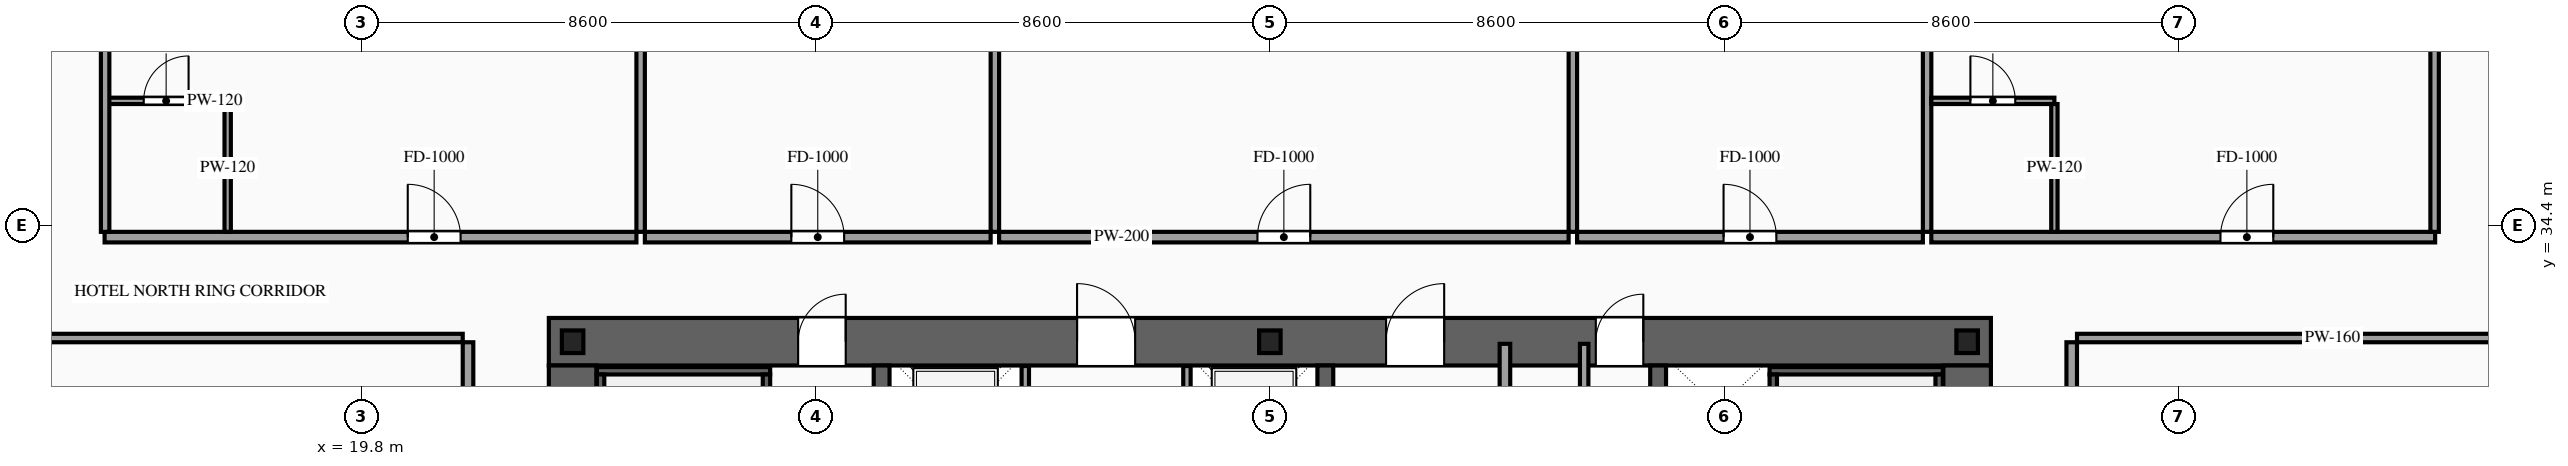
"""IFC4 building model, lengths in metres.
Left out: names, types, materials, properties, quantities, classifications, styles, units other than length and angle.
Written with IfcOpenShell. Run it as: python <this file> out.ifc"""

import sys

from ifc_helpers import new_model, si_unit, direction, frame, frame_2d, origin, origin_2d, place, context, subcontext, project, spatial, rectangle, i_section, extrude, source, transform, mapped, element, fill, save


model = new_model("IFC4")
c1 = context("Model", 3, precision=1e-05, world=origin(), true_north=direction((0.0, 1.0)))
c2 = subcontext(c1, "Body", "Model", "MODEL_VIEW")
j1 = project(units=[si_unit("LENGTHUNIT", "METRE"), si_unit("PLANEANGLEUNIT", "RADIAN")], contexts=[c1])
p1 = place(None, origin())
s1 = spatial("IfcSite", under=j1, at=p1, CompositionType="ELEMENT")
p2 = place(p1, origin())
s2 = spatial("IfcBuilding", under=s1, at=p2, CompositionType="ELEMENT")
p3 = place(p2, frame((0.0, 0.0, 56.8)))
s3 = spatial("IfcBuildingStorey", under=s2, at=p3, CompositionType="ELEMENT", Elevation=56.8)
p4 = place(p3, frame((23.35, 32.2, 0.0), z_axis=(0.0, 0.0, 1.0), x_axis=(1.0, 0.0, 0.0)))
e1 = element("IfcWall", 1, at=p4, inside=s3, PredefinedType="SHEAR", context=c2, shape_type="SweptSolid", body=[
    extrude(rectangle(XDim=27.3, YDim=0.9, at=frame_2d((13.65, 0.0))), origin(), (0.0, 0.0, 1.0), 3.6),
])
p5 = place(p4, frame((4.72, 0.0, 0.0)))
e2 = element("IfcOpeningElement", 2, at=p5, cuts=e1, PredefinedType="OPENING", context=c2, shape_type="SweptSolid", body=[
    extrude(rectangle(XDim=0.9, YDim=2.15, at=frame_2d((0.45, 1.075))), frame((0.0, 0.465, 0.0), z_axis=(0.0, -1.0, 0.0), x_axis=(1.0, 0.0, 0.0)), (0.0, 0.0, 1.0), 0.93),
])
p6 = place(p4, frame((10.0, 0.0, 0.0)))
e3 = element("IfcOpeningElement", 3, at=p6, cuts=e1, PredefinedType="OPENING", context=c2, shape_type="SweptSolid", body=[
    extrude(rectangle(XDim=1.1, YDim=2.2, at=frame_2d((0.55, 1.1))), frame((0.0, 0.465, 0.0), z_axis=(0.0, -1.0, 0.0), x_axis=(1.0, 0.0, 0.0)), (0.0, 0.0, 1.0), 0.93),
])
p7 = place(p4, frame((15.85, 0.0, 0.0)))
e4 = element("IfcOpeningElement", 4, at=p7, cuts=e1, PredefinedType="OPENING", context=c2, shape_type="SweptSolid", body=[
    extrude(rectangle(XDim=1.1, YDim=2.2, at=frame_2d((0.55, 1.1))), frame((0.0, 0.465, 0.0), z_axis=(0.0, -1.0, 0.0), x_axis=(1.0, 0.0, 0.0)), (0.0, 0.0, 1.0), 0.93),
])
p8 = place(p4, frame((19.82, 0.0, 0.0)))
e5 = element("IfcOpeningElement", 5, at=p8, cuts=e1, PredefinedType="OPENING", context=c2, shape_type="SweptSolid", body=[
    extrude(rectangle(XDim=0.9, YDim=2.15, at=frame_2d((0.45, 1.075))), frame((0.0, 0.465, 0.0), z_axis=(0.0, -1.0, 0.0), x_axis=(1.0, 0.0, 0.0)), (0.0, 0.0, 1.0), 0.93),
])
m1 = source(origin(), c2, "Body", "SweptSolid", [
    extrude(rectangle(XDim=11.9, YDim=0.9, at=frame_2d((5.95, 0.0))), origin(), (0.0, 0.0, 1.0), 3.6),
])
for number, where, z_axis, x_axis in (
    (6, (23.8, 19.85, 0.0), (0.0, 0.0, 1.0), (0.0, 1.0, 0.0)),
    (7, (50.2, 19.85, 0.0), (0.0, 0.0, 1.0), (0.0, 1.0, 0.0)),
):
    element("IfcWall", number, at=place(p3, frame(where, z_axis=z_axis, x_axis=x_axis)), inside=s3, PredefinedType="SHEAR", context=c2, shape_type="MappedRepresentation", body=[
        mapped(m1, transform((0.0, 0.0, 0.0), scale=1.0)),
    ])
m2 = source(origin(), c2, "Body", "SweptSolid", [
    extrude(rectangle(XDim=11.9, YDim=0.3, at=frame_2d((5.95, 0.0))), origin(), (0.0, 0.0, 1.0), 3.6),
])
for number, where, z_axis, x_axis in (
    (8, (29.65, 19.85, 0.0), (0.0, 0.0, 1.0), (0.0, 1.0, 0.0)),
    (9, (38.05, 19.85, 0.0), (0.0, 0.0, 1.0), (0.0, 1.0, 0.0)),
    (10, (44.35, 19.85, 0.0), (0.0, 0.0, 1.0), (0.0, 1.0, 0.0)),
):
    element("IfcWall", number, at=place(p3, frame(where, z_axis=z_axis, x_axis=x_axis)), inside=s3, PredefinedType="SOLIDWALL", context=c2, shape_type="MappedRepresentation", body=[
        mapped(m2, transform((0.0, 0.0, 0.0), scale=1.0)),
    ])
m3 = source(origin(), c2, "Body", "SweptSolid", [
    extrude(i_section(OverallWidth=0.407, OverallDepth=0.428, WebThickness=0.02, FlangeThickness=0.035, at=origin_2d()), origin(), (0.0, 0.0, 1.0), 3.6),
])
for number, where, z_axis, x_axis in (
    (11, (23.8, 32.2, 0.0), (0.0, 0.0, 1.0), (1.0, 0.0, 0.0)),
    (12, (37.0, 32.2, 0.0), (0.0, 0.0, 1.0), (1.0, 0.0, 0.0)),
    (13, (50.2, 32.2, 0.0), (0.0, 0.0, 1.0), (1.0, 0.0, 0.0)),
):
    element("IfcColumn", number, at=place(p3, frame(where, z_axis=z_axis, x_axis=x_axis)), inside=s3, PredefinedType="COLUMN", context=c2, shape_type="MappedRepresentation", body=[
        mapped(m3, transform((0.0, 0.0, 0.0), scale=1.0)),
    ])
p9 = place(p3, frame((32.37, 29.4, 0.0), z_axis=(0.0, 0.0, 1.0), x_axis=(0.0, 1.0, 0.0)))
e14 = element("IfcWall", 14, at=p9, inside=s3, PredefinedType="SOLIDWALL", context=c2, shape_type="SweptSolid", body=[
    extrude(rectangle(XDim=2.34, YDim=0.14, at=frame_2d((1.17, 0.0))), origin(), (0.0, 0.0, 1.0), 3.38),
])
p10 = place(p9, frame((0.62, 0.0, 0.0)))
e15 = element("IfcOpeningElement", 15, at=p10, cuts=e14, PredefinedType="OPENING", context=c2, shape_type="SweptSolid", body=[
    extrude(rectangle(XDim=1.1, YDim=2.2, at=frame_2d((0.55, 1.1))), frame((0.0, 0.085, 0.0), z_axis=(0.0, -1.0, 0.0), x_axis=(1.0, 0.0, 0.0)), (0.0, 0.0, 1.0), 0.17),
])
p11 = place(p3, frame((35.43, 29.4, 0.0), z_axis=(0.0, 0.0, 1.0), x_axis=(0.0, 1.0, 0.0)))
e16 = element("IfcWall", 16, at=p11, inside=s3, PredefinedType="SOLIDWALL", context=c2, shape_type="SweptSolid", body=[
    extrude(rectangle(XDim=2.34, YDim=0.14, at=frame_2d((1.17, 0.0))), origin(), (0.0, 0.0, 1.0), 3.38),
])
p12 = place(p11, frame((0.62, 0.0, 0.0)))
e17 = element("IfcOpeningElement", 17, at=p12, cuts=e16, PredefinedType="OPENING", context=c2, shape_type="SweptSolid", body=[
    extrude(rectangle(XDim=1.1, YDim=2.2, at=frame_2d((0.55, 1.1))), frame((0.0, 0.085, 0.0), z_axis=(0.0, -1.0, 0.0), x_axis=(1.0, 0.0, 0.0)), (0.0, 0.0, 1.0), 0.17),
])
m4 = source(origin(), c2, "Body", "SweptSolid", [
    extrude(rectangle(XDim=3.28, YDim=0.14, at=frame_2d((1.64, 0.0))), origin(), (0.0, 0.0, 1.0), 3.38),
])
p13 = place(p3, frame((24.26, 31.65, 0.0), z_axis=(0.0, 0.0, 1.0), x_axis=(1.0, 0.0, 0.0)))
e18 = element("IfcWall", 18, at=p13, inside=s3, PredefinedType="SOLIDWALL", context=c2, shape_type="MappedRepresentation", body=[
    mapped(m4, transform((0.0, 0.0, 0.0), scale=1.0)),
])
m5 = source(origin(), c2, "Body", "SweptSolid", [
    extrude(rectangle(XDim=8.94, YDim=0.14, at=frame_2d((4.47, 0.0))), origin(), (0.0, 0.0, 1.0), 3.38),
])
for number, where, z_axis, x_axis in (
    (19, (24.33, 22.64, 0.0), (0.0, 0.0, 1.0), (0.0, 1.0, 0.0)),
    (20, (27.47, 22.64, 0.0), (0.0, 0.0, 1.0), (0.0, 1.0, 0.0)),
):
    element("IfcWall", number, at=place(p3, frame(where, z_axis=z_axis, x_axis=x_axis)), inside=s3, PredefinedType="SOLIDWALL", context=c2, shape_type="MappedRepresentation", body=[
        mapped(m5, transform((0.0, 0.0, 0.0), scale=1.0)),
    ])
p14 = place(p3, frame((46.46, 31.65, 0.0), z_axis=(0.0, 0.0, 1.0), x_axis=(1.0, 0.0, 0.0)))
e21 = element("IfcWall", 21, at=p14, inside=s3, PredefinedType="SOLIDWALL", context=c2, shape_type="MappedRepresentation", body=[
    mapped(m4, transform((0.0, 0.0, 0.0), scale=1.0)),
])
for number, where, z_axis, x_axis in (
    (22, (46.53, 22.64, 0.0), (0.0, 0.0, 1.0), (0.0, 1.0, 0.0)),
    (23, (49.67, 22.64, 0.0), (0.0, 0.0, 1.0), (0.0, 1.0, 0.0)),
):
    element("IfcWall", number, at=place(p3, frame(where, z_axis=z_axis, x_axis=x_axis)), inside=s3, PredefinedType="SOLIDWALL", context=c2, shape_type="MappedRepresentation", body=[
        mapped(m5, transform((0.0, 0.0, 0.0), scale=1.0)),
    ])
m6 = source(origin(), c2, "Body", "SweptSolid", [
    extrude(rectangle(XDim=12.72, YDim=0.2, at=frame_2d((6.36, 0.0))), origin(), (0.0, 0.0, 1.0), 3.38),
])
p15 = place(p3, frame((41.45, 19.44, 0.0), z_axis=(0.0, 0.0, 1.0), x_axis=(0.0, 1.0, 0.0)))
e24 = element("IfcWall", 24, at=p15, inside=s3, PredefinedType="PARTITIONING", context=c2, shape_type="MappedRepresentation", body=[
    mapped(m6, transform((0.0, 0.0, 0.0), scale=1.0)),
])
m7 = source(origin(), c2, "Body", "SweptSolid", [
    extrude(rectangle(XDim=10.72, YDim=0.16, at=frame_2d((5.36, 0.0))), origin(), (0.0, 0.0, 1.0), 3.38),
])
p16 = place(p3, frame((42.95, 21.44, 0.0), z_axis=(0.0, 0.0, 1.0), x_axis=(0.0, 1.0, 0.0)))
e25 = element("IfcWall", 25, at=p16, inside=s3, PredefinedType="PARTITIONING", context=c2, shape_type="MappedRepresentation", body=[
    mapped(m7, transform((0.0, 0.0, 0.0), scale=1.0)),
])
p17 = place(p3, frame((14.94, 34.18, 0.0), z_axis=(0.0, 0.0, 1.0), x_axis=(1.0, 0.0, 0.0)))
e26 = element("IfcWall", 26, at=p17, inside=s3, PredefinedType="PARTITIONING", context=c2, shape_type="SweptSolid", body=[
    extrude(rectangle(XDim=10.068, YDim=0.2, at=frame_2d((5.034, 0.0))), origin(), (0.0, 0.0, 1.0), 3.38),
])
p18 = place(p17, frame((5.739, 0.0, 0.0)))
e27 = element("IfcOpeningElement", 27, at=p18, cuts=e26, PredefinedType="OPENING", context=c2, shape_type="SweptSolid", body=[
    extrude(rectangle(XDim=1.0, YDim=2.2, at=frame_2d((0.5, 1.1))), frame((0.0, 0.115, 0.0), z_axis=(0.0, -1.0, 0.0), x_axis=(1.0, 0.0, 0.0)), (0.0, 0.0, 1.0), 0.23),
])
m8 = source(origin(), c2, "Body", "SweptSolid", [
    extrude(rectangle(XDim=16.47, YDim=0.16, at=frame_2d((8.235, 0.0))), origin(), (0.0, 0.0, 1.0), 3.38),
])
p19 = place(p3, frame((25.088, 34.28, 0.0), z_axis=(0.0, 0.0, 1.0), x_axis=(0.0, 1.0, 0.0)))
e28 = element("IfcWall", 28, at=p19, inside=s3, PredefinedType="PARTITIONING", context=c2, shape_type="MappedRepresentation", body=[
    mapped(m8, transform((0.0, 0.0, 0.0), scale=1.0)),
])
p20 = place(p3, frame((14.94, 36.76, 0.0), z_axis=(0.0, 0.0, 1.0), x_axis=(1.0, 0.0, 0.0)))
e29 = element("IfcWall", 29, at=p20, inside=s3, PredefinedType="PARTITIONING", context=c2, shape_type="SweptSolid", body=[
    extrude(rectangle(XDim=2.33, YDim=0.12, at=frame_2d((1.165, 0.0))), origin(), (0.0, 0.0, 1.0), 3.38),
])
p21 = place(p20, frame((0.74, 0.0, 0.0)))
e30 = element("IfcOpeningElement", 30, at=p21, cuts=e29, PredefinedType="OPENING", context=c2, shape_type="SweptSolid", body=[
    extrude(rectangle(XDim=0.85, YDim=2.1, at=frame_2d((0.425, 1.05))), frame((0.0, 0.075, 0.0), z_axis=(0.0, -1.0, 0.0), x_axis=(1.0, 0.0, 0.0)), (0.0, 0.0, 1.0), 0.15),
])
m9 = source(origin(), c2, "Body", "SweptSolid", [
    extrude(rectangle(XDim=2.42, YDim=0.12, at=frame_2d((1.21, 0.0))), origin(), (0.0, 0.0, 1.0), 3.38),
])
p22 = place(p3, frame((17.27, 34.28, 0.0), z_axis=(0.0, 0.0, 1.0), x_axis=(0.0, 1.0, 0.0)))
e31 = element("IfcWall", 31, at=p22, inside=s3, PredefinedType="PARTITIONING", context=c2, shape_type="MappedRepresentation", body=[
    mapped(m9, transform((0.0, 0.0, 0.0), scale=1.0)),
])
p23 = place(p3, frame((25.168, 34.18, 0.0), z_axis=(0.0, 0.0, 1.0), x_axis=(1.0, 0.0, 0.0)))
e32 = element("IfcWall", 32, at=p23, inside=s3, PredefinedType="PARTITIONING", context=c2, shape_type="SweptSolid", body=[
    extrude(rectangle(XDim=6.546, YDim=0.2, at=frame_2d((3.273, 0.0))), origin(), (0.0, 0.0, 1.0), 3.38),
])
p24 = place(p23, frame((2.773, 0.0, 0.0)))
e33 = element("IfcOpeningElement", 33, at=p24, cuts=e32, PredefinedType="OPENING", context=c2, shape_type="SweptSolid", body=[
    extrude(rectangle(XDim=1.0, YDim=2.2, at=frame_2d((0.5, 1.1))), frame((0.0, 0.115, 0.0), z_axis=(0.0, -1.0, 0.0), x_axis=(1.0, 0.0, 0.0)), (0.0, 0.0, 1.0), 0.23),
])
p25 = place(p3, frame((31.794, 34.28, 0.0), z_axis=(0.0, 0.0, 1.0), x_axis=(0.0, 1.0, 0.0)))
e34 = element("IfcWall", 34, at=p25, inside=s3, PredefinedType="PARTITIONING", context=c2, shape_type="MappedRepresentation", body=[
    mapped(m8, transform((0.0, 0.0, 0.0), scale=1.0)),
])
p26 = place(p3, frame((31.874, 34.18, 0.0), z_axis=(0.0, 0.0, 1.0), x_axis=(1.0, 0.0, 0.0)))
e35 = element("IfcWall", 35, at=p26, inside=s3, PredefinedType="PARTITIONING", context=c2, shape_type="SweptSolid", body=[
    extrude(rectangle(XDim=10.782, YDim=0.2, at=frame_2d((5.391, 0.0))), origin(), (0.0, 0.0, 1.0), 3.38),
])
p27 = place(p26, frame((4.891, 0.0, 0.0)))
e36 = element("IfcOpeningElement", 36, at=p27, cuts=e35, PredefinedType="OPENING", context=c2, shape_type="SweptSolid", body=[
    extrude(rectangle(XDim=1.0, YDim=2.2, at=frame_2d((0.5, 1.1))), frame((0.0, 0.115, 0.0), z_axis=(0.0, -1.0, 0.0), x_axis=(1.0, 0.0, 0.0)), (0.0, 0.0, 1.0), 0.23),
])
p28 = place(p3, frame((42.736, 34.28, 0.0), z_axis=(0.0, 0.0, 1.0), x_axis=(0.0, 1.0, 0.0)))
e37 = element("IfcWall", 37, at=p28, inside=s3, PredefinedType="PARTITIONING", context=c2, shape_type="MappedRepresentation", body=[
    mapped(m8, transform((0.0, 0.0, 0.0), scale=1.0)),
])
p29 = place(p3, frame((42.816, 34.18, 0.0), z_axis=(0.0, 0.0, 1.0), x_axis=(1.0, 0.0, 0.0)))
e38 = element("IfcWall", 38, at=p29, inside=s3, PredefinedType="PARTITIONING", context=c2, shape_type="SweptSolid", body=[
    extrude(rectangle(XDim=6.546, YDim=0.2, at=frame_2d((3.273, 0.0))), origin(), (0.0, 0.0, 1.0), 3.38),
])
p30 = place(p29, frame((2.773, 0.0, 0.0)))
e39 = element("IfcOpeningElement", 39, at=p30, cuts=e38, PredefinedType="OPENING", context=c2, shape_type="SweptSolid", body=[
    extrude(rectangle(XDim=1.0, YDim=2.2, at=frame_2d((0.5, 1.1))), frame((0.0, 0.115, 0.0), z_axis=(0.0, -1.0, 0.0), x_axis=(1.0, 0.0, 0.0)), (0.0, 0.0, 1.0), 0.23),
])
p31 = place(p3, frame((49.442, 34.28, 0.0), z_axis=(0.0, 0.0, 1.0), x_axis=(0.0, 1.0, 0.0)))
e40 = element("IfcWall", 40, at=p31, inside=s3, PredefinedType="PARTITIONING", context=c2, shape_type="MappedRepresentation", body=[
    mapped(m8, transform((0.0, 0.0, 0.0), scale=1.0)),
])
p32 = place(p3, frame((49.522, 34.18, 0.0), z_axis=(0.0, 0.0, 1.0), x_axis=(1.0, 0.0, 0.0)))
e41 = element("IfcWall", 41, at=p32, inside=s3, PredefinedType="PARTITIONING", context=c2, shape_type="SweptSolid", body=[
    extrude(rectangle(XDim=9.538, YDim=0.2, at=frame_2d((4.769, 0.0))), origin(), (0.0, 0.0, 1.0), 3.38),
])
p33 = place(p32, frame((5.474, 0.0, 0.0)))
e42 = element("IfcOpeningElement", 42, at=p33, cuts=e41, PredefinedType="OPENING", context=c2, shape_type="SweptSolid", body=[
    extrude(rectangle(XDim=1.0, YDim=2.2, at=frame_2d((0.5, 1.1))), frame((0.0, 0.115, 0.0), z_axis=(0.0, -1.0, 0.0), x_axis=(1.0, 0.0, 0.0)), (0.0, 0.0, 1.0), 0.23),
])
m10 = source(origin(), c2, "Body", "SweptSolid", [
    extrude(rectangle(XDim=16.32, YDim=0.16, at=frame_2d((8.16, 0.0))), origin(), (0.0, 0.0, 1.0), 3.38),
])
for number, where, z_axis, x_axis in (
    (43, (14.95, 34.28, 0.0), (0.0, 0.0, 1.0), (0.0, 1.0, 0.0)),
    (44, (59.05, 34.28, 0.0), (0.0, 0.0, 1.0), (0.0, 1.0, 0.0)),
):
    element("IfcWall", number, at=place(p3, frame(where, z_axis=z_axis, x_axis=x_axis)), inside=s3, PredefinedType="PARTITIONING", context=c2, shape_type="MappedRepresentation", body=[
        mapped(m10, transform((0.0, 0.0, 0.0), scale=1.0)),
    ])
p34 = place(p3, frame((49.522, 36.76, 0.0), z_axis=(0.0, 0.0, 1.0), x_axis=(1.0, 0.0, 0.0)))
e45 = element("IfcWall", 45, at=p34, inside=s3, PredefinedType="PARTITIONING", context=c2, shape_type="SweptSolid", body=[
    extrude(rectangle(XDim=2.33, YDim=0.12, at=frame_2d((1.165, 0.0))), origin(), (0.0, 0.0, 1.0), 3.38),
])
p35 = place(p34, frame((0.74, 0.0, 0.0)))
e46 = element("IfcOpeningElement", 46, at=p35, cuts=e45, PredefinedType="OPENING", context=c2, shape_type="SweptSolid", body=[
    extrude(rectangle(XDim=0.85, YDim=2.1, at=frame_2d((0.425, 1.05))), frame((0.0, 0.075, 0.0), z_axis=(0.0, -1.0, 0.0), x_axis=(1.0, 0.0, 0.0)), (0.0, 0.0, 1.0), 0.15),
])
p36 = place(p3, frame((51.852, 34.28, 0.0), z_axis=(0.0, 0.0, 1.0), x_axis=(0.0, 1.0, 0.0)))
e47 = element("IfcWall", 47, at=p36, inside=s3, PredefinedType="PARTITIONING", context=c2, shape_type="MappedRepresentation", body=[
    mapped(m9, transform((0.0, 0.0, 0.0), scale=1.0)),
])
p37 = place(p3, frame((21.82, 25.88, 0.0), z_axis=(0.0, 0.0, 1.0), x_axis=(0.0, 1.0, 0.0)))
e48 = element("IfcWall", 48, at=p37, inside=s3, PredefinedType="PARTITIONING", context=c2, shape_type="SweptSolid", body=[
    extrude(rectangle(XDim=6.31, YDim=0.2, at=frame_2d((3.155, 0.0))), origin(), (0.0, 0.0, 1.0), 3.38),
])
p38 = place(p37, frame((3.835, 0.0, 0.0)))
e49 = element("IfcOpeningElement", 49, at=p38, cuts=e48, PredefinedType="OPENING", context=c2, shape_type="SweptSolid", body=[
    extrude(rectangle(XDim=1.0, YDim=2.2, at=frame_2d((0.5, 1.1))), frame((0.0, 0.115, 0.0), z_axis=(0.0, -1.0, 0.0), x_axis=(1.0, 0.0, 0.0)), (0.0, 0.0, 1.0), 0.23),
])
m11 = source(origin(), c2, "Body", "SweptSolid", [
    extrude(rectangle(XDim=9.67, YDim=0.16, at=frame_2d((4.835, 0.0))), origin(), (0.0, 0.0, 1.0), 2.875),
])
p39 = place(p3, frame((12.05, 32.27, 0.0), z_axis=(0.0, 0.0, 1.0), x_axis=(1.0, 0.0, 0.0)))
e50 = element("IfcWall", 50, at=p39, inside=s3, PredefinedType="PARTITIONING", context=c2, shape_type="MappedRepresentation", body=[
    mapped(m11, transform((0.0, 0.0, 0.0), scale=1.0)),
])
p40 = place(p3, frame((52.18, 25.88, 0.0), z_axis=(0.0, 0.0, 1.0), x_axis=(0.0, 1.0, 0.0)))
e51 = element("IfcWall", 51, at=p40, inside=s3, PredefinedType="PARTITIONING", context=c2, shape_type="SweptSolid", body=[
    extrude(rectangle(XDim=6.31, YDim=0.2, at=frame_2d((3.155, 0.0))), origin(), (0.0, 0.0, 1.0), 3.38),
])
p41 = place(p40, frame((3.835, 0.0, 0.0)))
e52 = element("IfcOpeningElement", 52, at=p41, cuts=e51, PredefinedType="OPENING", context=c2, shape_type="SweptSolid", body=[
    extrude(rectangle(XDim=1.0, YDim=2.2, at=frame_2d((0.5, 1.1))), frame((0.0, 0.115, 0.0), z_axis=(0.0, -1.0, 0.0), x_axis=(1.0, 0.0, 0.0)), (0.0, 0.0, 1.0), 0.23),
])
p42 = place(p3, frame((52.28, 32.27, 0.0), z_axis=(0.0, 0.0, 1.0), x_axis=(1.0, 0.0, 0.0)))
e53 = element("IfcWall", 53, at=p42, inside=s3, PredefinedType="PARTITIONING", context=c2, shape_type="MappedRepresentation", body=[
    mapped(m11, transform((0.0, 0.0, 0.0), scale=1.0)),
])
m12 = source(origin(), c2, "Body", "SweptSolid", [
    extrude(rectangle(XDim=0.9, YDim=2.15, at=frame_2d((0.45, 1.075))), frame((0.0, 0.025, 0.0), z_axis=(0.0, -1.0, 0.0), x_axis=(1.0, 0.0, 0.0)), (0.0, 0.0, 1.0), 0.05),
])
p43 = place(p5, origin())
e54 = element("IfcDoor", 54, at=p43, inside=s3, OperationType="SINGLE_SWING_RIGHT", PredefinedType="DOOR", context=c2, shape_type="MappedRepresentation", body=[
    mapped(m12, transform((0.0, 0.0, 0.0), scale=1.0)),
])
fill(e2, e54)
m13 = source(origin(), c2, "Body", "SweptSolid", [
    extrude(rectangle(XDim=1.1, YDim=2.2, at=frame_2d((0.55, 1.1))), frame((0.0, 0.025, 0.0), z_axis=(0.0, -1.0, 0.0), x_axis=(1.0, 0.0, 0.0)), (0.0, 0.0, 1.0), 0.05),
])
p44 = place(p6, origin())
e55 = element("IfcDoor", 55, at=p44, inside=s3, OperationType="SINGLE_SWING_LEFT", PredefinedType="DOOR", context=c2, shape_type="MappedRepresentation", body=[
    mapped(m13, transform((0.0, 0.0, 0.0), scale=1.0)),
])
fill(e3, e55)
p45 = place(p7, origin())
e56 = element("IfcDoor", 56, at=p45, inside=s3, OperationType="SINGLE_SWING_RIGHT", PredefinedType="DOOR", context=c2, shape_type="MappedRepresentation", body=[
    mapped(m13, transform((0.0, 0.0, 0.0), scale=1.0)),
])
fill(e4, e56)
p46 = place(p8, origin())
e57 = element("IfcDoor", 57, at=p46, inside=s3, OperationType="SINGLE_SWING_RIGHT", PredefinedType="DOOR", context=c2, shape_type="MappedRepresentation", body=[
    mapped(m12, transform((0.0, 0.0, 0.0), scale=1.0)),
])
fill(e5, e57)
m14 = source(origin(), c2, "Body", "SweptSolid", [
    extrude(rectangle(XDim=1.0, YDim=2.2, at=frame_2d((0.5, 1.1))), frame((0.0, 0.025, 0.0), z_axis=(0.0, -1.0, 0.0), x_axis=(1.0, 0.0, 0.0)), (0.0, 0.0, 1.0), 0.05),
])
p47 = place(p18, origin())
e58 = element("IfcDoor", 58, at=p47, inside=s3, OperationType="SINGLE_SWING_LEFT", PredefinedType="DOOR", context=c2, shape_type="MappedRepresentation", body=[
    mapped(m14, transform((0.0, 0.0, 0.0), scale=1.0)),
])
fill(e27, e58)
m15 = source(origin(), c2, "Body", "SweptSolid", [
    extrude(rectangle(XDim=0.85, YDim=2.1, at=frame_2d((0.425, 1.05))), frame((0.0, 0.025, 0.0), z_axis=(0.0, -1.0, 0.0), x_axis=(1.0, 0.0, 0.0)), (0.0, 0.0, 1.0), 0.05),
])
p48 = place(p21, origin())
e59 = element("IfcDoor", 59, at=p48, inside=s3, OperationType="SINGLE_SWING_RIGHT", PredefinedType="DOOR", context=c2, shape_type="MappedRepresentation", body=[
    mapped(m15, transform((0.0, 0.0, 0.0), scale=1.0)),
])
fill(e30, e59)
p49 = place(p24, origin())
e60 = element("IfcDoor", 60, at=p49, inside=s3, OperationType="SINGLE_SWING_LEFT", PredefinedType="DOOR", context=c2, shape_type="MappedRepresentation", body=[
    mapped(m14, transform((0.0, 0.0, 0.0), scale=1.0)),
])
fill(e33, e60)
p50 = place(p27, origin())
e61 = element("IfcDoor", 61, at=p50, inside=s3, OperationType="SINGLE_SWING_RIGHT", PredefinedType="DOOR", context=c2, shape_type="MappedRepresentation", body=[
    mapped(m14, transform((0.0, 0.0, 0.0), scale=1.0)),
])
fill(e36, e61)
p51 = place(p30, origin())
e62 = element("IfcDoor", 62, at=p51, inside=s3, OperationType="SINGLE_SWING_LEFT", PredefinedType="DOOR", context=c2, shape_type="MappedRepresentation", body=[
    mapped(m14, transform((0.0, 0.0, 0.0), scale=1.0)),
])
fill(e39, e62)
p52 = place(p33, origin())
e63 = element("IfcDoor", 63, at=p52, inside=s3, OperationType="SINGLE_SWING_RIGHT", PredefinedType="DOOR", context=c2, shape_type="MappedRepresentation", body=[
    mapped(m14, transform((0.0, 0.0, 0.0), scale=1.0)),
])
fill(e42, e63)
p53 = place(p35, origin())
e64 = element("IfcDoor", 64, at=p53, inside=s3, OperationType="SINGLE_SWING_LEFT", PredefinedType="DOOR", context=c2, shape_type="MappedRepresentation", body=[
    mapped(m15, transform((0.0, 0.0, 0.0), scale=1.0)),
])
fill(e46, e64)
save(model, sys.argv[1])
